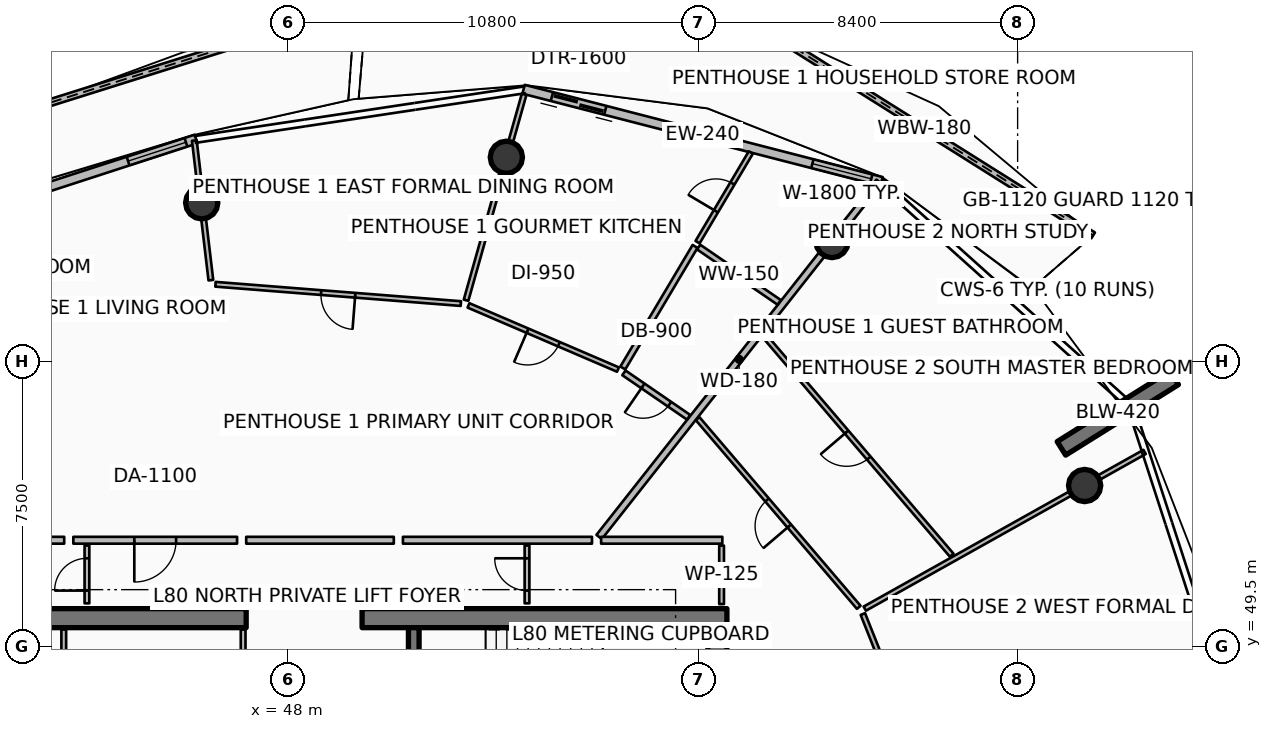
"""IFC4 building model, lengths in metres.
Left out: names, types, materials, properties, quantities, classifications, styles, units other than length and angle.
Written with IfcOpenShell. Run it as: python <this file> out.ifc"""

import sys

from ifc_helpers import new_model, si_unit, direction, frame, frame_2d, origin, origin_2d, place, context, subcontext, project, spatial, polyline, rectangle, circle, outline, extrude, element, fill, save


model = new_model("IFC4")
c1 = context("Model", 3, precision=1e-05, world=origin(), true_north=direction((0.0, 1.0)))
c2 = subcontext(c1, "Body", "Model", "MODEL_VIEW")
j1 = project(units=[si_unit("LENGTHUNIT", "METRE"), si_unit("PLANEANGLEUNIT", "RADIAN")], contexts=[c1])
p1 = place(None, origin())
s1 = spatial("IfcSite", under=j1, at=p1, CompositionType="ELEMENT")
p2 = place(p1, origin())
s2 = spatial("IfcBuilding", under=s1, at=p2, CompositionType="ELEMENT")
p3 = place(p2, frame((0.0, 0.0, 317.9)))
s3 = spatial("IfcBuildingStorey", under=s2, at=p3, CompositionType="ELEMENT", Elevation=317.9)
p4 = place(p3, frame((37.3, 50.25, 0.0), z_axis=(0.0, 0.0, 1.0), x_axis=(1.0, 0.0, 0.0)))
e1 = element("IfcWall", 1, at=p4, inside=s3, PredefinedType="SHEAR", context=c2, shape_type="SweptSolid", body=[
    extrude(rectangle(XDim=9.6, YDim=0.5, at=frame_2d((4.8, 0.0))), origin(), (0.0, 0.0, 1.0), 4.2),
])
p5 = place(p3, frame((49.95, 50.25, 0.0), z_axis=(0.0, 0.0, 1.0), x_axis=(1.0, 0.0, 0.0)))
e2 = element("IfcWall", 2, at=p5, inside=s3, PredefinedType="SHEAR", context=c2, shape_type="SweptSolid", body=[
    extrude(rectangle(XDim=9.6, YDim=0.5, at=frame_2d((4.8, 0.0))), origin(), (0.0, 0.0, 1.0), 4.2),
])
p6 = place(p3, frame((59.3, 34.0, 0.0), z_axis=(0.0, 0.0, 1.0), x_axis=(0.0, 1.0, 0.0)))
e3 = element("IfcWall", 3, at=p6, inside=s3, PredefinedType="SHEAR", context=c2, shape_type="SweptSolid", body=[
    extrude(rectangle(XDim=16.0, YDim=0.5, at=frame_2d((8.0, 0.0))), origin(), (0.0, 0.0, 1.0), 4.2),
])
p7 = place(p3, frame((51.31, 46.5, 0.0), z_axis=(0.0, 0.0, 1.0), x_axis=(0.0, 1.0, 0.0)))
e4 = element("IfcWall", 4, at=p7, inside=s3, PredefinedType="SHEAR", context=c2, shape_type="SweptSolid", body=[
    extrude(rectangle(XDim=3.5, YDim=0.28, at=frame_2d((1.75, 0.0))), origin(), (0.0, 0.0, 1.0), 4.2),
])
p8 = place(p3, frame((68.353, 54.718, 0.0), z_axis=(0.0, 0.0, 1.0), x_axis=(0.848053161125, 0.529911158502, 0.0)))
e5 = element("IfcWall", 5, at=p8, inside=s3, PredefinedType="SOLIDWALL", context=c2, shape_type="SweptSolid", body=[
    extrude(rectangle(XDim=3.5, YDim=0.42, at=frame_2d((1.75, 0.0))), origin(), (0.0, 0.0, 1.0), 4.2),
])
for number, where, z_axis, x_axis in (
    (6, (68.963, 53.74, 0.0), (0.0, 0.0, 1.0), (1.0, 0.0, 0.0)),
    (7, (62.316, 60.159, 0.0), (0.0, 0.0, 1.0), (1.0, 0.0, 0.0)),
    (8, (53.747, 62.376, 0.0), (0.0, 0.0, 1.0), (1.0, 0.0, 0.0)),
):
    element("IfcColumn", number, at=place(p3, frame(where, z_axis=z_axis, x_axis=x_axis)), inside=s3, PredefinedType="COLUMN", context=c2, shape_type="SweptSolid", body=[
        extrude(circle(Radius=0.425, at=origin_2d()), origin(), (0.0, 0.0, 1.0), 3.94),
    ])
p9 = place(p3, frame((45.73, 61.179, 0.0), z_axis=(0.0, 0.0, 1.0), x_axis=(1.0, 0.0, 0.0)))
e9 = element("IfcColumn", 9, at=p9, inside=s3, PredefinedType="COLUMN", context=c2, shape_type="SweptSolid", body=[
    extrude(circle(Radius=0.425, at=origin_2d()), origin(), (0.0, 0.0, 1.0), 4.196),
])
p10 = place(p3, frame((69.187, 60.321, 0.0), z_axis=(0.0, 0.0, 1.0), x_axis=(-0.846699200114, 0.532071860302, 0.0)))
e10 = element("IfcWall", 10, at=p10, inside=s3, PredefinedType="PARAPET", context=c2, shape_type="SweptSolid", body=[
    extrude(outline(polyline([(0.0, 0.0), (10.483, 0.0), (10.483, 1.832), (5.242, 1.696), (0.0, 1.497), (0.0, 0.0)])), frame((0.0, 0.09, 0.0), z_axis=(0.0, -1.0, 0.0), x_axis=(1.0, 0.0, 0.0)), (0.0, 0.0, 1.0), 0.18),
])
p11 = place(p3, frame((49.766, 66.337, 0.0), z_axis=(0.0, 0.0, 1.0), x_axis=(-0.953971961219, -0.299895810587, 0.0)))
e11 = element("IfcWall", 11, at=p11, inside=s3, PredefinedType="PARAPET", context=c2, shape_type="SweptSolid", body=[
    extrude(outline(polyline([(0.0, 0.0), (9.08, 0.0), (9.08, 1.348), (4.54, 1.562), (0.0, 1.747), (0.0, 0.0)])), frame((0.0, 0.09, 0.0), z_axis=(0.0, -1.0, 0.0), x_axis=(1.0, 0.0, 0.0)), (0.0, 0.0, 1.0), 0.18),
])
p12 = place(p3, frame((63.62, 61.74, 0.0), z_axis=(0.0, 0.0, 1.0), x_axis=(-0.968389076094, 0.249444577616, 0.0)))
e12 = element("IfcWall", 12, at=p12, inside=s3, PredefinedType="SOLIDWALL", context=c2, shape_type="SweptSolid", body=[
    extrude(rectangle(XDim=9.728, YDim=0.24, at=frame_2d((4.864, 0.0))), origin(), (0.0, 0.0, 1.0), 2.89),
])
p13 = place(p12, frame((7.508, 0.0, 0.0)))
e13 = element("IfcOpeningElement", 13, at=p13, cuts=e12, PredefinedType="OPENING", context=c2, shape_type="SweptSolid", body=[
    extrude(rectangle(XDim=1.45, YDim=2.15, at=frame_2d((0.725, 1.075))), frame((0.0, 0.13, 0.0), z_axis=(0.0, -1.0, 0.0), x_axis=(1.0, 0.0, 0.0)), (0.0, 0.0, 1.0), 0.26),
])
p14 = place(p12, frame((0.28, 0.0, 0.65)))
e14 = element("IfcOpeningElement", 14, at=p14, cuts=e12, PredefinedType="OPENING", context=c2, shape_type="SweptSolid", body=[
    extrude(rectangle(XDim=1.6, YDim=1.5, at=frame_2d((0.8, 0.75))), frame((0.0, 0.13, 0.0), z_axis=(0.0, -1.0, 0.0), x_axis=(1.0, 0.0, 0.0)), (0.0, 0.0, 1.0), 0.26),
])
p15 = place(p3, frame((45.581, 62.857, 0.0), z_axis=(0.0, 0.0, 1.0), x_axis=(-0.951053547111, -0.309026132434, 0.0)))
e15 = element("IfcWall", 15, at=p15, inside=s3, PredefinedType="SOLIDWALL", context=c2, shape_type="SweptSolid", body=[
    extrude(rectangle(XDim=8.289, YDim=0.24, at=frame_2d((4.145, 0.0))), origin(), (0.0, 0.0, 1.0), 2.89),
])
p16 = place(p15, frame((6.069, 0.0, 0.0)))
e16 = element("IfcOpeningElement", 16, at=p16, cuts=e15, PredefinedType="OPENING", context=c2, shape_type="SweptSolid", body=[
    extrude(rectangle(XDim=1.45, YDim=2.15, at=frame_2d((0.725, 1.075))), frame((0.0, 0.13, 0.0), z_axis=(0.0, -1.0, 0.0), x_axis=(1.0, 0.0, 0.0)), (0.0, 0.0, 1.0), 0.26),
])
p17 = place(p15, frame((0.28, 0.0, 0.65)))
e17 = element("IfcOpeningElement", 17, at=p17, cuts=e15, PredefinedType="OPENING", context=c2, shape_type="SweptSolid", body=[
    extrude(rectangle(XDim=1.6, YDim=1.5, at=frame_2d((0.8, 0.75))), frame((0.0, 0.13, 0.0), z_axis=(0.0, -1.0, 0.0), x_axis=(1.0, 0.0, 0.0)), (0.0, 0.0, 1.0), 0.26),
])
for number, where, z_axis, x_axis in (
    (18, (46.82, 47.92, 0.0), (0.0, 0.0, 1.0), (0.0, 1.0, 0.0)),
    (19, (42.1, 47.92, 0.0), (0.0, 0.0, 1.0), (0.0, 1.0, 0.0)),
):
    element("IfcWall", number, at=place(p3, frame(where, z_axis=z_axis, x_axis=x_axis)), inside=s3, PredefinedType="PARTITIONING", context=c2, shape_type="SweptSolid", body=[
        extrude(rectangle(XDim=2.03, YDim=0.125, at=frame_2d((1.015, 0.0))), origin(), (0.0, 0.0, 1.0), 3.38),
    ])
p18 = place(p3, frame((59.41, 50.62, 0.0), z_axis=(0.0, 0.0, 1.0), x_axis=(0.0, 1.0, 0.0)))
e20 = element("IfcWall", 20, at=p18, inside=s3, PredefinedType="PARTITIONING", context=c2, shape_type="SweptSolid", body=[
    extrude(rectangle(XDim=1.54, YDim=0.125, at=frame_2d((0.77, 0.0))), origin(), (0.0, 0.0, 1.0), 3.38),
])
p19 = place(p3, frame((42.71, 50.64, 0.0), z_axis=(0.0, 0.0, 1.0), x_axis=(0.0, 1.0, 0.0)))
e21 = element("IfcWall", 21, at=p19, inside=s3, PredefinedType="PARTITIONING", context=c2, shape_type="SweptSolid", body=[
    extrude(rectangle(XDim=1.52, YDim=0.125, at=frame_2d((0.76, 0.0))), origin(), (0.0, 0.0, 1.0), 3.38),
])
p20 = place(p19, frame((0.335, 0.0, 0.0)))
e22 = element("IfcOpeningElement", 22, at=p20, cuts=e21, PredefinedType="OPENING", context=c2, shape_type="SweptSolid", body=[
    extrude(rectangle(XDim=0.85, YDim=2.06, at=frame_2d((0.425, 1.03))), frame((0.0, 0.073, 0.0), z_axis=(0.0, -1.0, 0.0), x_axis=(1.0, 0.0, 0.0)), (0.0, 0.0, 1.0), 0.145),
])
p21 = place(p3, frame((54.29, 50.64, 0.0), z_axis=(0.0, 0.0, 1.0), x_axis=(0.0, 1.0, 0.0)))
e23 = element("IfcWall", 23, at=p21, inside=s3, PredefinedType="PARTITIONING", context=c2, shape_type="SweptSolid", body=[
    extrude(rectangle(XDim=1.52, YDim=0.125, at=frame_2d((0.76, 0.0))), origin(), (0.0, 0.0, 1.0), 3.38),
])
p22 = place(p21, frame((0.335, 0.0, 0.0)))
e24 = element("IfcOpeningElement", 24, at=p22, cuts=e23, PredefinedType="OPENING", context=c2, shape_type="SweptSolid", body=[
    extrude(rectangle(XDim=0.85, YDim=2.06, at=frame_2d((0.425, 1.03))), frame((0.0, 0.073, 0.0), z_axis=(0.0, -1.0, 0.0), x_axis=(1.0, 0.0, 0.0)), (0.0, 0.0, 1.0), 0.145),
])
p23 = place(p3, frame((56.188, 52.386, 0.0), z_axis=(0.0, 0.0, 1.0), x_axis=(0.619092742501, 0.78531788225, 0.0)))
e25 = element("IfcWall", 25, at=p23, inside=s3, PredefinedType="PARTITIONING", context=c2, shape_type="SweptSolid", body=[
    extrude(rectangle(XDim=11.901, YDim=0.18, at=frame_2d((5.951, 0.0))), origin(), (0.0, 0.0, 1.0), 3.38),
])
p24 = place(p3, frame((46.661, 52.3, 0.0), z_axis=(0.0, 0.0, 1.0), x_axis=(-1.0, 0.0, 0.0)))
e26 = element("IfcWall", 26, at=p24, inside=s3, PredefinedType="PARTITIONING", context=c2, shape_type="SweptSolid", body=[
    extrude(rectangle(XDim=4.309, YDim=0.18, at=frame_2d((2.155, 0.0))), origin(), (0.0, 0.0, 1.0), 3.38),
])
p25 = place(p24, frame((1.604, 0.0, 0.0)))
e27 = element("IfcOpeningElement", 27, at=p25, cuts=e26, PredefinedType="OPENING", context=c2, shape_type="SweptSolid", body=[
    extrude(rectangle(XDim=1.1, YDim=2.1, at=frame_2d((0.55, 1.05))), frame((0.0, 0.1, 0.0), z_axis=(0.0, -1.0, 0.0), x_axis=(1.0, 0.0, 0.0)), (0.0, 0.0, 1.0), 0.2),
])
p26 = place(p3, frame((56.0, 52.3, 0.0), z_axis=(0.0, 0.0, 1.0), x_axis=(-1.0, 0.0, 0.0)))
e28 = element("IfcWall", 28, at=p26, inside=s3, PredefinedType="PARTITIONING", context=c2, shape_type="SweptSolid", body=[
    extrude(rectangle(XDim=4.975, YDim=0.18, at=frame_2d((2.488, 0.0))), origin(), (0.0, 0.0, 1.0), 3.38),
])
p27 = place(p3, frame((58.543, 55.535, 0.0), z_axis=(0.0, 0.0, 1.0), x_axis=(-0.824355515216, 0.566072419865, 0.0)))
e29 = element("IfcWall", 29, at=p27, inside=s3, PredefinedType="PARTITIONING", context=c2, shape_type="SweptSolid", body=[
    extrude(rectangle(XDim=2.066, YDim=0.15, at=frame_2d((1.033, 0.0))), origin(), (0.0, 0.0, 1.0), 3.38),
])
p28 = place(p27, frame((0.608, 0.0, 0.0)))
e30 = element("IfcOpeningElement", 30, at=p28, cuts=e29, PredefinedType="OPENING", context=c2, shape_type="SweptSolid", body=[
    extrude(rectangle(XDim=0.85, YDim=2.06, at=frame_2d((0.425, 1.03))), frame((0.0, 0.085, 0.0), z_axis=(0.0, -1.0, 0.0), x_axis=(1.0, 0.0, 0.0)), (0.0, 0.0, 1.0), 0.17),
])
p29 = place(p3, frame((60.927, 58.559, 0.0), z_axis=(0.0, 0.0, 1.0), x_axis=(-0.824349211277, 0.566081600007, 0.0)))
e31 = element("IfcWall", 31, at=p29, inside=s3, PredefinedType="PARTITIONING", context=c2, shape_type="SweptSolid", body=[
    extrude(rectangle(XDim=2.572, YDim=0.15, at=frame_2d((1.286, 0.0))), origin(), (0.0, 0.0, 1.0), 3.38),
])
p30 = place(p3, frame((56.812, 56.833, 0.0), z_axis=(0.0, 0.0, 1.0), x_axis=(0.510726768545, 0.859743082491, 0.0)))
e32 = element("IfcWall", 32, at=p30, inside=s3, PredefinedType="PARTITIONING", context=c2, shape_type="SweptSolid", body=[
    extrude(rectangle(XDim=3.72, YDim=0.15, at=frame_2d((1.86, 0.0))), origin(), (0.0, 0.0, 1.0), 3.38),
])
p31 = place(p3, frame((58.778, 60.143, 0.0), z_axis=(0.0, 0.0, 1.0), x_axis=(0.510643596404, 0.85979248511, 0.0)))
e33 = element("IfcWall", 33, at=p31, inside=s3, PredefinedType="PARTITIONING", context=c2, shape_type="SweptSolid", body=[
    extrude(rectangle(XDim=2.744, YDim=0.125, at=frame_2d((1.372, 0.0))), origin(), (0.0, 0.0, 1.0), 3.38),
])
p32 = place(p31, frame((0.947, 0.0, 0.0)))
e34 = element("IfcOpeningElement", 34, at=p32, cuts=e33, PredefinedType="OPENING", context=c2, shape_type="SweptSolid", body=[
    extrude(rectangle(XDim=0.85, YDim=2.06, at=frame_2d((0.425, 1.03))), frame((0.0, 0.073, 0.0), z_axis=(0.0, -1.0, 0.0), x_axis=(1.0, 0.0, 0.0)), (0.0, 0.0, 1.0), 0.145),
])
p33 = place(p3, frame((56.683, 56.791, 0.0), z_axis=(0.0, 0.0, 1.0), x_axis=(-0.918926533299, 0.394428734246, 0.0)))
e35 = element("IfcWall", 35, at=p33, inside=s3, PredefinedType="PARTITIONING", context=c2, shape_type="SweptSolid", body=[
    extrude(rectangle(XDim=4.28, YDim=0.125, at=frame_2d((2.14, 0.0))), origin(), (0.0, 0.0, 1.0), 3.38),
])
p34 = place(p33, frame((1.69, 0.0, 0.0)))
e36 = element("IfcOpeningElement", 36, at=p34, cuts=e35, PredefinedType="OPENING", context=c2, shape_type="SweptSolid", body=[
    extrude(rectangle(XDim=0.9, YDim=2.08, at=frame_2d((0.45, 1.04))), frame((0.0, 0.073, 0.0), z_axis=(0.0, -1.0, 0.0), x_axis=(1.0, 0.0, 0.0)), (0.0, 0.0, 1.0), 0.145),
])
p35 = place(p3, frame((50.785, 52.3, 0.0), z_axis=(0.0, 0.0, 1.0), x_axis=(-1.0, 0.0, 0.0)))
e37 = element("IfcWall", 37, at=p35, inside=s3, PredefinedType="PARTITIONING", context=c2, shape_type="SweptSolid", body=[
    extrude(rectangle(XDim=3.884, YDim=0.18, at=frame_2d((1.942, 0.0))), origin(), (0.0, 0.0, 1.0), 3.38),
])
p36 = place(p3, frame((52.686, 58.615, 0.0), z_axis=(0.0, 0.0, 1.0), x_axis=(0.271455015282, 0.962451128462, 0.0)))
e38 = element("IfcWall", 38, at=p36, inside=s3, PredefinedType="PARTITIONING", context=c2, shape_type="SweptSolid", body=[
    extrude(rectangle(XDim=5.63, YDim=0.125, at=frame_2d((2.815, 0.0))), origin(), (0.0, 0.0, 1.0), 3.38),
])
p37 = place(p3, frame((45.971, 59.143, 0.0), z_axis=(0.0, 0.0, 1.0), x_axis=(-0.117541965763, 0.99306791625, 0.0)))
e39 = element("IfcWall", 39, at=p37, inside=s3, PredefinedType="PARTITIONING", context=c2, shape_type="SweptSolid", body=[
    extrude(rectangle(XDim=3.699, YDim=0.125, at=frame_2d((1.85, 0.0))), origin(), (0.0, 0.0, 1.0), 3.38),
])
p38 = place(p3, frame((52.549, 58.527, 0.0), z_axis=(0.0, 0.0, 1.0), x_axis=(-0.996915635348, 0.078480672772, 0.0)))
e40 = element("IfcWall", 40, at=p38, inside=s3, PredefinedType="PARTITIONING", context=c2, shape_type="SweptSolid", body=[
    extrude(rectangle(XDim=6.477, YDim=0.125, at=frame_2d((3.238, 0.0))), origin(), (0.0, 0.0, 1.0), 3.38),
])
p39 = place(p38, frame((2.788, 0.0, 0.0)))
e41 = element("IfcOpeningElement", 41, at=p39, cuts=e40, PredefinedType="OPENING", context=c2, shape_type="SweptSolid", body=[
    extrude(rectangle(XDim=0.9, YDim=2.08, at=frame_2d((0.45, 1.04))), frame((0.0, 0.073, 0.0), z_axis=(0.0, -1.0, 0.0), x_axis=(1.0, 0.0, 0.0)), (0.0, 0.0, 1.0), 0.145),
])
p40 = place(p3, frame((42.112, 52.3, 0.0), z_axis=(0.0, 0.0, 1.0), x_axis=(-1.0, 0.0, 0.0)))
e42 = element("IfcWall", 42, at=p40, inside=s3, PredefinedType="PARTITIONING", context=c2, shape_type="SweptSolid", body=[
    extrude(rectangle(XDim=4.692, YDim=0.18, at=frame_2d((2.346, 0.0))), origin(), (0.0, 0.0, 1.0), 3.38),
])
p41 = place(p3, frame((64.743, 46.297, 0.0), z_axis=(0.0, 0.0, 1.0), x_axis=(-0.369569971378, 0.929202903706, 0.0)))
e43 = element("IfcWall", 43, at=p41, inside=s3, PredefinedType="PARTITIONING", context=c2, shape_type="SweptSolid", body=[
    extrude(rectangle(XDim=4.371, YDim=0.125, at=frame_2d((2.186, 0.0))), origin(), (0.0, 0.0, 1.0), 3.38),
])
p42 = place(p41, frame((1.736, 0.0, 0.0)))
e44 = element("IfcOpeningElement", 44, at=p42, cuts=e43, PredefinedType="OPENING", context=c2, shape_type="SweptSolid", body=[
    extrude(rectangle(XDim=0.9, YDim=2.08, at=frame_2d((0.45, 1.04))), frame((0.0, 0.073, 0.0), z_axis=(0.0, -1.0, 0.0), x_axis=(1.0, 0.0, 0.0)), (0.0, 0.0, 1.0), 0.145),
])
p43 = place(p3, frame((59.43, 52.3, 0.0), z_axis=(0.0, 0.0, 1.0), x_axis=(-1.0, 0.0, 0.0)))
e45 = element("IfcWall", 45, at=p43, inside=s3, PredefinedType="PARTITIONING", context=c2, shape_type="SweptSolid", body=[
    extrude(rectangle(XDim=3.19, YDim=0.18, at=frame_2d((1.595, 0.0))), origin(), (0.0, 0.0, 1.0), 3.38),
])
p44 = place(p3, frame((63.178, 50.5, 0.0), z_axis=(0.0, 0.0, 1.0), x_axis=(0.872495656661, 0.488621867201, 0.0)))
e46 = element("IfcWall", 46, at=p44, inside=s3, PredefinedType="PARTITIONING", context=c2, shape_type="SweptSolid", body=[
    extrude(rectangle(XDim=8.44, YDim=0.125, at=frame_2d((4.22, 0.0))), origin(), (0.0, 0.0, 1.0), 3.38),
])
p45 = place(p3, frame((63.019, 50.535, 0.0), z_axis=(0.0, 0.0, 1.0), x_axis=(-0.649450715324, 0.760403687764, 0.0)))
e47 = element("IfcWall", 47, at=p45, inside=s3, PredefinedType="PARTITIONING", context=c2, shape_type="SweptSolid", body=[
    extrude(rectangle(XDim=6.529, YDim=0.125, at=frame_2d((3.264, 0.0))), origin(), (0.0, 0.0, 1.0), 3.38),
])
p46 = place(p45, frame((2.814, 0.0, 0.0)))
e48 = element("IfcOpeningElement", 48, at=p46, cuts=e47, PredefinedType="OPENING", context=c2, shape_type="SweptSolid", body=[
    extrude(rectangle(XDim=0.9, YDim=2.08, at=frame_2d((0.45, 1.04))), frame((0.0, 0.073, 0.0), z_axis=(0.0, -1.0, 0.0), x_axis=(1.0, 0.0, 0.0)), (0.0, 0.0, 1.0), 0.145),
])
p47 = place(p3, frame((65.467, 51.906, 0.0), z_axis=(0.0, 0.0, 1.0), x_axis=(-0.649439942486, 0.760412888571, 0.0)))
e49 = element("IfcWall", 49, at=p47, inside=s3, PredefinedType="PARTITIONING", context=c2, shape_type="SweptSolid", body=[
    extrude(rectangle(XDim=7.623, YDim=0.125, at=frame_2d((3.812, 0.0))), origin(), (0.0, 0.0, 1.0), 3.38),
])
p48 = place(p47, frame((3.362, 0.0, 0.0)))
e50 = element("IfcOpeningElement", 50, at=p48, cuts=e49, PredefinedType="OPENING", context=c2, shape_type="SweptSolid", body=[
    extrude(rectangle(XDim=0.9, YDim=2.08, at=frame_2d((0.45, 1.04))), frame((0.0, 0.073, 0.0), z_axis=(0.0, -1.0, 0.0), x_axis=(1.0, 0.0, 0.0)), (0.0, 0.0, 1.0), 0.145),
])
p49 = place(p13, origin())
e51 = element("IfcDoor", 51, at=p49, inside=s3, OperationType="DOUBLE_DOOR_SLIDING", PredefinedType="DOOR", context=c2, shape_type="SweptSolid", body=[
    extrude(rectangle(XDim=1.45, YDim=2.15, at=frame_2d((0.725, 1.075))), frame((0.0, 0.025, 0.0), z_axis=(0.0, -1.0, 0.0), x_axis=(1.0, 0.0, 0.0)), (0.0, 0.0, 1.0), 0.05),
])
fill(e13, e51)
p50 = place(p14, origin())
e52 = element("IfcWindow", 52, at=p50, inside=s3, PartitioningType="SINGLE_PANEL", PredefinedType="WINDOW", context=c2, shape_type="SweptSolid", body=[
    extrude(rectangle(XDim=1.6, YDim=1.5, at=frame_2d((0.8, 0.75))), frame((0.0, 0.03, 0.0), z_axis=(0.0, -1.0, 0.0), x_axis=(1.0, 0.0, 0.0)), (0.0, 0.0, 1.0), 0.06),
])
fill(e14, e52)
p51 = place(p17, origin())
e53 = element("IfcWindow", 53, at=p51, inside=s3, PartitioningType="SINGLE_PANEL", PredefinedType="WINDOW", context=c2, shape_type="SweptSolid", body=[
    extrude(rectangle(XDim=1.6, YDim=1.5, at=frame_2d((0.8, 0.75))), frame((0.0, 0.03, 0.0), z_axis=(0.0, -1.0, 0.0), x_axis=(1.0, 0.0, 0.0)), (0.0, 0.0, 1.0), 0.06),
])
fill(e17, e53)
p52 = place(p20, origin())
e54 = element("IfcDoor", 54, at=p52, inside=s3, OperationType="SINGLE_SWING_LEFT", PredefinedType="DOOR", context=c2, shape_type="SweptSolid", body=[
    extrude(rectangle(XDim=0.85, YDim=2.06, at=frame_2d((0.425, 1.03))), frame((0.0, 0.025, 0.0), z_axis=(0.0, -1.0, 0.0), x_axis=(1.0, 0.0, 0.0)), (0.0, 0.0, 1.0), 0.05),
])
fill(e22, e54)
p53 = place(p22, origin())
e55 = element("IfcDoor", 55, at=p53, inside=s3, OperationType="SINGLE_SWING_RIGHT", PredefinedType="DOOR", context=c2, shape_type="SweptSolid", body=[
    extrude(rectangle(XDim=0.85, YDim=2.06, at=frame_2d((0.425, 1.03))), frame((0.0, 0.025, 0.0), z_axis=(0.0, -1.0, 0.0), x_axis=(1.0, 0.0, 0.0)), (0.0, 0.0, 1.0), 0.05),
])
fill(e24, e55)
p54 = place(p25, origin())
e56 = element("IfcDoor", 56, at=p54, inside=s3, OperationType="SINGLE_SWING_RIGHT", PredefinedType="DOOR", context=c2, shape_type="SweptSolid", body=[
    extrude(rectangle(XDim=1.1, YDim=2.1, at=frame_2d((0.55, 1.05))), frame((0.0, 0.025, 0.0), z_axis=(0.0, -1.0, 0.0), x_axis=(1.0, 0.0, 0.0)), (0.0, 0.0, 1.0), 0.05),
])
fill(e27, e56)
p55 = place(p28, origin())
e57 = element("IfcDoor", 57, at=p55, inside=s3, OperationType="SINGLE_SWING_RIGHT", PredefinedType="DOOR", context=c2, shape_type="SweptSolid", body=[
    extrude(rectangle(XDim=0.85, YDim=2.06, at=frame_2d((0.425, 1.03))), frame((0.0, 0.025, 0.0), z_axis=(0.0, -1.0, 0.0), x_axis=(1.0, 0.0, 0.0)), (0.0, 0.0, 1.0), 0.05),
])
fill(e30, e57)
p56 = place(p32, origin())
e58 = element("IfcDoor", 58, at=p56, inside=s3, OperationType="SINGLE_SWING_LEFT", PredefinedType="DOOR", context=c2, shape_type="SweptSolid", body=[
    extrude(rectangle(XDim=0.85, YDim=2.06, at=frame_2d((0.425, 1.03))), frame((0.0, 0.025, 0.0), z_axis=(0.0, -1.0, 0.0), x_axis=(1.0, 0.0, 0.0)), (0.0, 0.0, 1.0), 0.05),
])
fill(e34, e58)
p57 = place(p34, origin())
e59 = element("IfcDoor", 59, at=p57, inside=s3, OperationType="SINGLE_SWING_RIGHT", PredefinedType="DOOR", context=c2, shape_type="SweptSolid", body=[
    extrude(rectangle(XDim=0.9, YDim=2.08, at=frame_2d((0.45, 1.04))), frame((0.0, 0.025, 0.0), z_axis=(0.0, -1.0, 0.0), x_axis=(1.0, 0.0, 0.0)), (0.0, 0.0, 1.0), 0.05),
])
fill(e36, e59)
p58 = place(p39, origin())
e60 = element("IfcDoor", 60, at=p58, inside=s3, OperationType="SINGLE_SWING_LEFT", PredefinedType="DOOR", context=c2, shape_type="SweptSolid", body=[
    extrude(rectangle(XDim=0.9, YDim=2.08, at=frame_2d((0.45, 1.04))), frame((0.0, 0.025, 0.0), z_axis=(0.0, -1.0, 0.0), x_axis=(1.0, 0.0, 0.0)), (0.0, 0.0, 1.0), 0.05),
])
fill(e41, e60)
p59 = place(p46, origin())
e61 = element("IfcDoor", 61, at=p59, inside=s3, OperationType="SINGLE_SWING_LEFT", PredefinedType="DOOR", context=c2, shape_type="SweptSolid", body=[
    extrude(rectangle(XDim=0.9, YDim=2.08, at=frame_2d((0.45, 1.04))), frame((0.0, 0.025, 0.0), z_axis=(0.0, -1.0, 0.0), x_axis=(1.0, 0.0, 0.0)), (0.0, 0.0, 1.0), 0.05),
])
fill(e48, e61)
p60 = place(p48, origin())
e62 = element("IfcDoor", 62, at=p60, inside=s3, OperationType="SINGLE_SWING_RIGHT", PredefinedType="DOOR", context=c2, shape_type="SweptSolid", body=[
    extrude(rectangle(XDim=0.9, YDim=2.08, at=frame_2d((0.45, 1.04))), frame((0.0, 0.025, 0.0), z_axis=(0.0, -1.0, 0.0), x_axis=(1.0, 0.0, 0.0)), (0.0, 0.0, 1.0), 0.05),
])
fill(e50, e62)
save(model, sys.argv[1])
